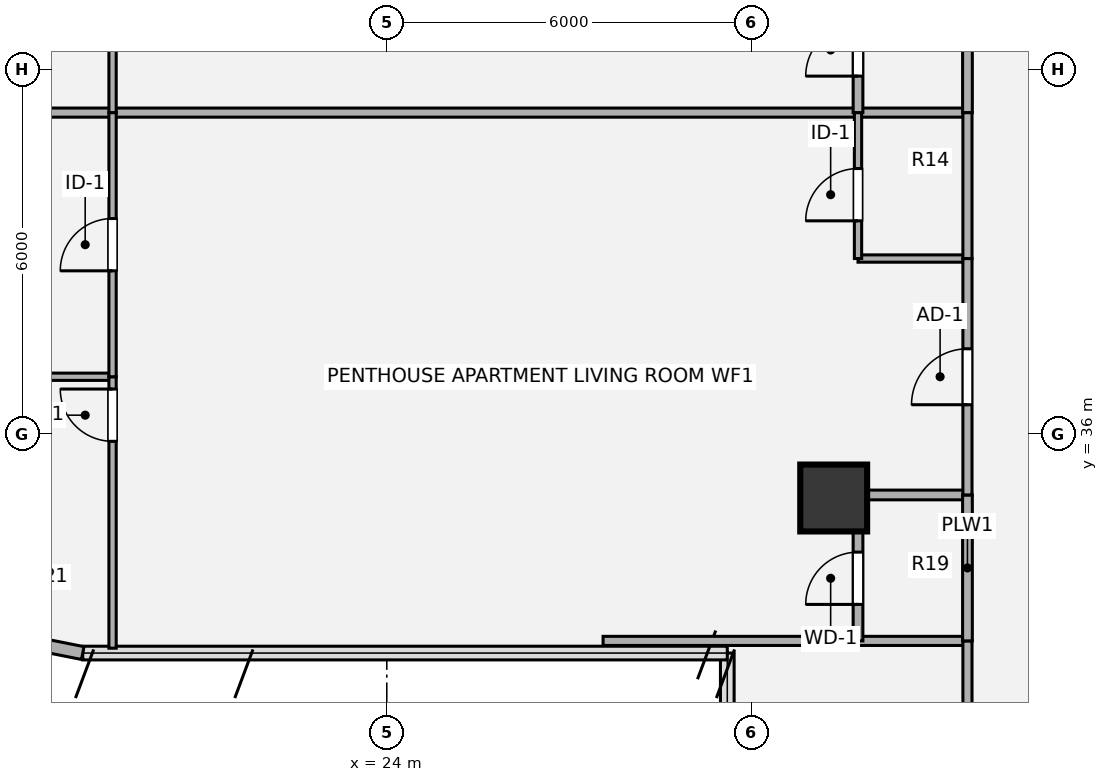
"""IFC4 building model, lengths in metres.
Left out: names, types, materials, properties, quantities, classifications, styles, units other than length and angle.
Written with IfcOpenShell. Run it as: python <this file> out.ifc"""

import sys

from ifc_helpers import new_model, si_unit, direction, frame, frame_2d, origin, origin_2d, place, context, subcontext, project, spatial, rectangle, hollow_circle, extrude, source, transform, mapped, element, fill, save


model = new_model("IFC4")
c1 = context("Model", 3, precision=1e-05, world=origin(), true_north=direction((0.0, 1.0)))
c2 = subcontext(c1, "Body", "Model", "MODEL_VIEW")
j1 = project(units=[si_unit("LENGTHUNIT", "METRE"), si_unit("PLANEANGLEUNIT", "RADIAN")], contexts=[c1])
p1 = place(None, origin())
s1 = spatial("IfcSite", under=j1, at=p1, CompositionType="ELEMENT")
p2 = place(p1, origin())
s2 = spatial("IfcBuilding", under=s1, at=p2, CompositionType="ELEMENT")
p3 = place(p2, frame((0.0, 0.0, 156.42)))
s3 = spatial("IfcBuildingStorey", under=s2, at=p3, CompositionType="ELEMENT", Elevation=156.42)
m1 = source(origin(), c2, "Body", "SweptSolid", [
    extrude(hollow_circle(Radius=0.55, WallThickness=0.04, at=origin_2d()), origin(), (0.0, 0.0, 1.0), 3.78),
])
p4 = place(p3, frame((31.35, 34.95, 0.0), z_axis=(0.0, 0.0, 1.0), x_axis=(1.0, 0.0, 0.0)))
e1 = element("IfcColumn", 1, at=p4, inside=s3, PredefinedType="COLUMN", context=c2, shape_type="MappedRepresentation", body=[
    mapped(m1, transform((0.0, 0.0, 0.0), x_axis=(1.0, 0.0, 0.0), y_axis=(0.0, 1.0, 0.0), z_axis=(0.0, 0.0, 1.0), scale=1.0)),
])
p5 = place(p3, frame((19.0, 32.4, 0.0), z_axis=(0.0, 0.0, 1.0), x_axis=(-0.980775717779, 0.195138390419, 0.0)))
e2 = element("IfcWall", 2, at=p5, inside=s3, PredefinedType="SOLIDWALL", context=c2, shape_type="SweptSolid", body=[
    extrude(rectangle(XDim=1.249, YDim=0.215, at=frame_2d((0.624, 0.0))), origin(), (0.0, 0.0, 1.0), 3.53),
])
p6 = place(p3, frame((27.557, 32.6, 0.0), z_axis=(0.0, 0.0, 1.0), x_axis=(1.0, 0.0, 0.0)))
e3 = element("IfcWall", 3, at=p6, inside=s3, PredefinedType="PARTITIONING", context=c2, shape_type="SweptSolid", body=[
    extrude(rectangle(XDim=5.993, YDim=0.15, at=frame_2d((2.997, 0.0))), origin(), (0.0, 0.0, 1.0), 3.5),
])
p7 = place(p3, frame((31.75, 35.0, 0.0), z_axis=(0.0, 0.0, 1.0), x_axis=(1.0, 0.0, 0.0)))
e4 = element("IfcWall", 4, at=p7, inside=s3, PredefinedType="PLUMBINGWALL", context=c2, shape_type="SweptSolid", body=[
    extrude(rectangle(XDim=1.8, YDim=0.16, at=frame_2d((0.9, 0.0))), origin(), (0.0, 0.0, 1.0), 2.903),
])
p8 = place(p3, frame((15.88, 36.944, 0.0), z_axis=(0.0, 0.0, 1.0), x_axis=(1.0, 0.0, 0.0)))
e5 = element("IfcWall", 5, at=p8, inside=s3, PredefinedType="PARTITIONING", context=c2, shape_type="SweptSolid", body=[
    extrude(rectangle(XDim=3.61, YDim=0.12, at=frame_2d((1.805, 0.0))), origin(), (0.0, 0.0, 1.0), 2.982),
])
p9 = place(p3, frame((31.75, 38.888, 0.0), z_axis=(0.0, 0.0, 1.0), x_axis=(1.0, 0.0, 0.0)))
e6 = element("IfcWall", 6, at=p9, inside=s3, PredefinedType="PARTITIONING", context=c2, shape_type="SweptSolid", body=[
    extrude(rectangle(XDim=1.8, YDim=0.12, at=frame_2d((0.9, 0.0))), origin(), (0.0, 0.0, 1.0), 3.259),
])
p10 = place(p3, frame((15.88, 41.288, 0.0), z_axis=(0.0, 0.0, 1.0), x_axis=(1.0, 0.0, 0.0)))
e7 = element("IfcWall", 7, at=p10, inside=s3, PredefinedType="PARTITIONING", context=c2, shape_type="SweptSolid", body=[
    extrude(rectangle(XDim=17.67, YDim=0.15, at=frame_2d((8.835, 0.0))), origin(), (0.0, 0.0, 1.0), 2.982),
])
p11 = place(p3, frame((19.49, 32.48, 0.0), z_axis=(0.0, 0.0, 1.0), x_axis=(0.0, 1.0, 0.0)))
e8 = element("IfcWall", 8, at=p11, inside=s3, PredefinedType="PARTITIONING", context=c2, shape_type="SweptSolid", body=[
    extrude(rectangle(XDim=4.464, YDim=0.12, at=frame_2d((2.232, 0.0))), origin(), (0.0, 0.0, 1.0), 3.5),
])
p12 = place(p11, frame((3.402, 0.0, 0.0)))
e9 = element("IfcOpeningElement", 9, at=p12, cuts=e8, PredefinedType="OPENING", context=c2, shape_type="SweptSolid", body=[
    extrude(rectangle(XDim=0.86, YDim=2.1, at=origin_2d()), frame((0.43, 0.07, 1.05), z_axis=(0.0, -1.0, 0.0), x_axis=(1.0, 0.0, 0.0)), (0.0, 0.0, 1.0), 0.14),
])
p13 = place(p3, frame((19.49, 36.944, 0.0), z_axis=(0.0, 0.0, 1.0), x_axis=(0.0, 1.0, 0.0)))
e10 = element("IfcWall", 10, at=p13, inside=s3, PredefinedType="PARTITIONING", context=c2, shape_type="SweptSolid", body=[
    extrude(rectangle(XDim=4.344, YDim=0.12, at=frame_2d((2.172, 0.0))), origin(), (0.0, 0.0, 1.0), 3.5),
])
p14 = place(p13, frame((1.742, 0.0, 0.0)))
e11 = element("IfcOpeningElement", 11, at=p14, cuts=e10, PredefinedType="OPENING", context=c2, shape_type="SweptSolid", body=[
    extrude(rectangle(XDim=0.86, YDim=2.1, at=origin_2d()), frame((0.43, 0.07, 1.05), z_axis=(0.0, -1.0, 0.0), x_axis=(1.0, 0.0, 0.0)), (0.0, 0.0, 1.0), 0.14),
])
p15 = place(p3, frame((19.49, 41.288, 0.0), z_axis=(0.0, 0.0, 1.0), x_axis=(0.0, 1.0, 0.0)))
e12 = element("IfcWall", 12, at=p15, inside=s3, PredefinedType="PARTITIONING", context=c2, shape_type="SweptSolid", body=[
    extrude(rectangle(XDim=4.706, YDim=0.12, at=frame_2d((2.353, 0.0))), origin(), (0.0, 0.0, 1.0), 3.5),
])
p16 = place(p15, frame((1.923, 0.0, 0.0)))
e13 = element("IfcOpeningElement", 13, at=p16, cuts=e12, PredefinedType="OPENING", context=c2, shape_type="SweptSolid", body=[
    extrude(rectangle(XDim=0.86, YDim=2.1, at=origin_2d()), frame((0.43, 0.07, 1.05), z_axis=(0.0, -1.0, 0.0), x_axis=(1.0, 0.0, 0.0)), (0.0, 0.0, 1.0), 0.14),
])
p17 = place(p3, frame((31.75, 32.6, 0.0), z_axis=(0.0, 0.0, 1.0), x_axis=(0.0, 1.0, 0.0)))
e14 = element("IfcWall", 14, at=p17, inside=s3, PredefinedType="PLUMBINGWALL", context=c2, shape_type="SweptSolid", body=[
    extrude(rectangle(XDim=2.4, YDim=0.16, at=frame_2d((1.2, 0.0))), origin(), (0.0, 0.0, 1.0), 3.5),
])
p18 = place(p17, frame((0.6, 0.0, 0.0)))
e15 = element("IfcOpeningElement", 15, at=p18, cuts=e14, PredefinedType="OPENING", context=c2, shape_type="SweptSolid", body=[
    extrude(rectangle(XDim=0.86, YDim=2.1, at=origin_2d()), frame((0.43, 0.09, 1.05), z_axis=(0.0, -1.0, 0.0), x_axis=(1.0, 0.0, 0.0)), (0.0, 0.0, 1.0), 0.18),
])
p19 = place(p3, frame((31.75, 38.888, 0.0), z_axis=(0.0, 0.0, 1.0), x_axis=(0.0, 1.0, 0.0)))
e16 = element("IfcWall", 16, at=p19, inside=s3, PredefinedType="PARTITIONING", context=c2, shape_type="SweptSolid", body=[
    extrude(rectangle(XDim=2.4, YDim=0.12, at=frame_2d((1.2, 0.0))), origin(), (0.0, 0.0, 1.0), 3.5),
])
p20 = place(p19, frame((0.62, 0.0, 0.0)))
e17 = element("IfcOpeningElement", 17, at=p20, cuts=e16, PredefinedType="OPENING", context=c2, shape_type="SweptSolid", body=[
    extrude(rectangle(XDim=0.86, YDim=2.1, at=origin_2d()), frame((0.43, 0.07, 1.05), z_axis=(0.0, -1.0, 0.0), x_axis=(1.0, 0.0, 0.0)), (0.0, 0.0, 1.0), 0.14),
])
p21 = place(p3, frame((31.75, 41.288, 0.0), z_axis=(0.0, 0.0, 1.0), x_axis=(0.0, 1.0, 0.0)))
e18 = element("IfcWall", 18, at=p21, inside=s3, PredefinedType="PLUMBINGWALL", context=c2, shape_type="SweptSolid", body=[
    extrude(rectangle(XDim=2.4, YDim=0.16, at=frame_2d((1.2, 0.0))), origin(), (0.0, 0.0, 1.0), 3.5),
])
p22 = place(p21, frame((0.6, 0.0, 0.0)))
e19 = element("IfcOpeningElement", 19, at=p22, cuts=e18, PredefinedType="OPENING", context=c2, shape_type="SweptSolid", body=[
    extrude(rectangle(XDim=0.86, YDim=2.1, at=origin_2d()), frame((0.43, 0.09, 1.05), z_axis=(0.0, -1.0, 0.0), x_axis=(1.0, 0.0, 0.0)), (0.0, 0.0, 1.0), 0.18),
])
p23 = place(p3, frame((33.55, 21.2, 0.0), z_axis=(0.0, 0.0, 1.0), x_axis=(0.0, 1.0, 0.0)))
e20 = element("IfcWall", 20, at=p23, inside=s3, PredefinedType="PARTITIONING", context=c2, shape_type="SweptSolid", body=[
    extrude(rectangle(XDim=11.4, YDim=0.15, at=frame_2d((5.7, 0.0))), origin(), (0.0, 0.0, 1.0), 3.5),
])
p24 = place(p23, frame((5.14, 0.0, 0.0)))
e21 = element("IfcOpeningElement", 21, at=p24, cuts=e20, PredefinedType="OPENING", context=c2, shape_type="SweptSolid", body=[
    extrude(rectangle(XDim=0.86, YDim=2.1, at=origin_2d()), frame((0.43, 0.085, 1.05), z_axis=(0.0, -1.0, 0.0), x_axis=(1.0, 0.0, 0.0)), (0.0, 0.0, 1.0), 0.17),
])
p25 = place(p3, frame((33.55, 32.6, 0.0), z_axis=(0.0, 0.0, 1.0), x_axis=(0.0, 1.0, 0.0)))
e22 = element("IfcWall", 22, at=p25, inside=s3, PredefinedType="PLUMBINGWALL", context=c2, shape_type="SweptSolid", body=[
    extrude(rectangle(XDim=2.4, YDim=0.16, at=frame_2d((1.2, 0.0))), origin(), (0.0, 0.0, 1.0), 3.5),
])
p26 = place(p3, frame((33.55, 35.0, 0.0), z_axis=(0.0, 0.0, 1.0), x_axis=(0.0, 1.0, 0.0)))
e23 = element("IfcWall", 23, at=p26, inside=s3, PredefinedType="PARTITIONING", context=c2, shape_type="SweptSolid", body=[
    extrude(rectangle(XDim=3.888, YDim=0.15, at=frame_2d((1.944, 0.0))), origin(), (0.0, 0.0, 1.0), 3.5),
])
p27 = place(p26, frame((1.484, 0.0, 0.0)))
e24 = element("IfcOpeningElement", 24, at=p27, cuts=e23, PredefinedType="OPENING", context=c2, shape_type="SweptSolid", body=[
    extrude(rectangle(XDim=0.92, YDim=2.1, at=origin_2d()), frame((0.46, 0.085, 1.05), z_axis=(0.0, -1.0, 0.0), x_axis=(1.0, 0.0, 0.0)), (0.0, 0.0, 1.0), 0.17),
])
p28 = place(p3, frame((33.55, 38.888, 0.0), z_axis=(0.0, 0.0, 1.0), x_axis=(0.0, 1.0, 0.0)))
e25 = element("IfcWall", 25, at=p28, inside=s3, PredefinedType="PARTITIONING", context=c2, shape_type="SweptSolid", body=[
    extrude(rectangle(XDim=2.4, YDim=0.15, at=frame_2d((1.2, 0.0))), origin(), (0.0, 0.0, 1.0), 3.5),
])
p29 = place(p3, frame((33.55, 41.288, 0.0), z_axis=(0.0, 0.0, 1.0), x_axis=(0.0, 1.0, 0.0)))
e26 = element("IfcWall", 26, at=p29, inside=s3, PredefinedType="PLUMBINGWALL", context=c2, shape_type="SweptSolid", body=[
    extrude(rectangle(XDim=2.4, YDim=0.16, at=frame_2d((1.2, 0.0))), origin(), (0.0, 0.0, 1.0), 3.5),
])
m2 = source(origin(), c2, "Body", "SweptSolid", [
    extrude(rectangle(XDim=0.86, YDim=2.1, at=origin_2d()), frame((0.43, 0.025, 1.05), z_axis=(0.0, -1.0, 0.0), x_axis=(1.0, 0.0, 0.0)), (0.0, 0.0, 1.0), 0.05),
])
p30 = place(p12, origin())
e27 = element("IfcDoor", 27, at=p30, inside=s3, OperationType="SINGLE_SWING_RIGHT", PredefinedType="DOOR", context=c2, shape_type="MappedRepresentation", body=[
    mapped(m2, transform((0.0, 0.0, 0.0), x_axis=(1.0, 0.0, 0.0), y_axis=(0.0, 1.0, 0.0), z_axis=(0.0, 0.0, 1.0), scale=1.0)),
])
fill(e9, e27)
p31 = place(p14, origin())
e28 = element("IfcDoor", 28, at=p31, inside=s3, OperationType="SINGLE_SWING_LEFT", PredefinedType="DOOR", context=c2, shape_type="MappedRepresentation", body=[
    mapped(m2, transform((0.0, 0.0, 0.0), x_axis=(1.0, 0.0, 0.0), y_axis=(0.0, 1.0, 0.0), z_axis=(0.0, 0.0, 1.0), scale=1.0)),
])
fill(e11, e28)
m3 = source(origin(), c2, "Body", "SweptSolid", [
    extrude(rectangle(XDim=0.86, YDim=2.1, at=origin_2d()), frame((0.43, 0.025, 1.05), z_axis=(0.0, -1.0, 0.0), x_axis=(1.0, 0.0, 0.0)), (0.0, 0.0, 1.0), 0.05),
])
p32 = place(p18, origin())
e29 = element("IfcDoor", 29, at=p32, inside=s3, OperationType="SINGLE_SWING_LEFT", PredefinedType="DOOR", context=c2, shape_type="MappedRepresentation", body=[
    mapped(m3, transform((0.0, 0.0, 0.0), x_axis=(1.0, 0.0, 0.0), y_axis=(0.0, 1.0, 0.0), z_axis=(0.0, 0.0, 1.0), scale=1.0)),
])
fill(e15, e29)
p33 = place(p20, origin())
e30 = element("IfcDoor", 30, at=p33, inside=s3, OperationType="SINGLE_SWING_LEFT", PredefinedType="DOOR", context=c2, shape_type="MappedRepresentation", body=[
    mapped(m2, transform((0.0, 0.0, 0.0), x_axis=(1.0, 0.0, 0.0), y_axis=(0.0, 1.0, 0.0), z_axis=(0.0, 0.0, 1.0), scale=1.0)),
])
fill(e17, e30)
p34 = place(p22, origin())
e31 = element("IfcDoor", 31, at=p34, inside=s3, OperationType="SINGLE_SWING_LEFT", PredefinedType="DOOR", context=c2, shape_type="MappedRepresentation", body=[
    mapped(m3, transform((0.0, 0.0, 0.0), x_axis=(1.0, 0.0, 0.0), y_axis=(0.0, 1.0, 0.0), z_axis=(0.0, 0.0, 1.0), scale=1.0)),
])
fill(e19, e31)
m4 = source(origin(), c2, "Body", "SweptSolid", [
    extrude(rectangle(XDim=0.92, YDim=2.1, at=origin_2d()), frame((0.46, 0.025, 1.05), z_axis=(0.0, -1.0, 0.0), x_axis=(1.0, 0.0, 0.0)), (0.0, 0.0, 1.0), 0.05),
])
p35 = place(p27, origin())
e32 = element("IfcDoor", 32, at=p35, inside=s3, OperationType="SINGLE_SWING_LEFT", PredefinedType="DOOR", context=c2, shape_type="MappedRepresentation", body=[
    mapped(m4, transform((0.0, 0.0, 0.0), x_axis=(1.0, 0.0, 0.0), y_axis=(0.0, 1.0, 0.0), z_axis=(0.0, 0.0, 1.0), scale=1.0)),
])
fill(e24, e32)
save(model, sys.argv[1])
